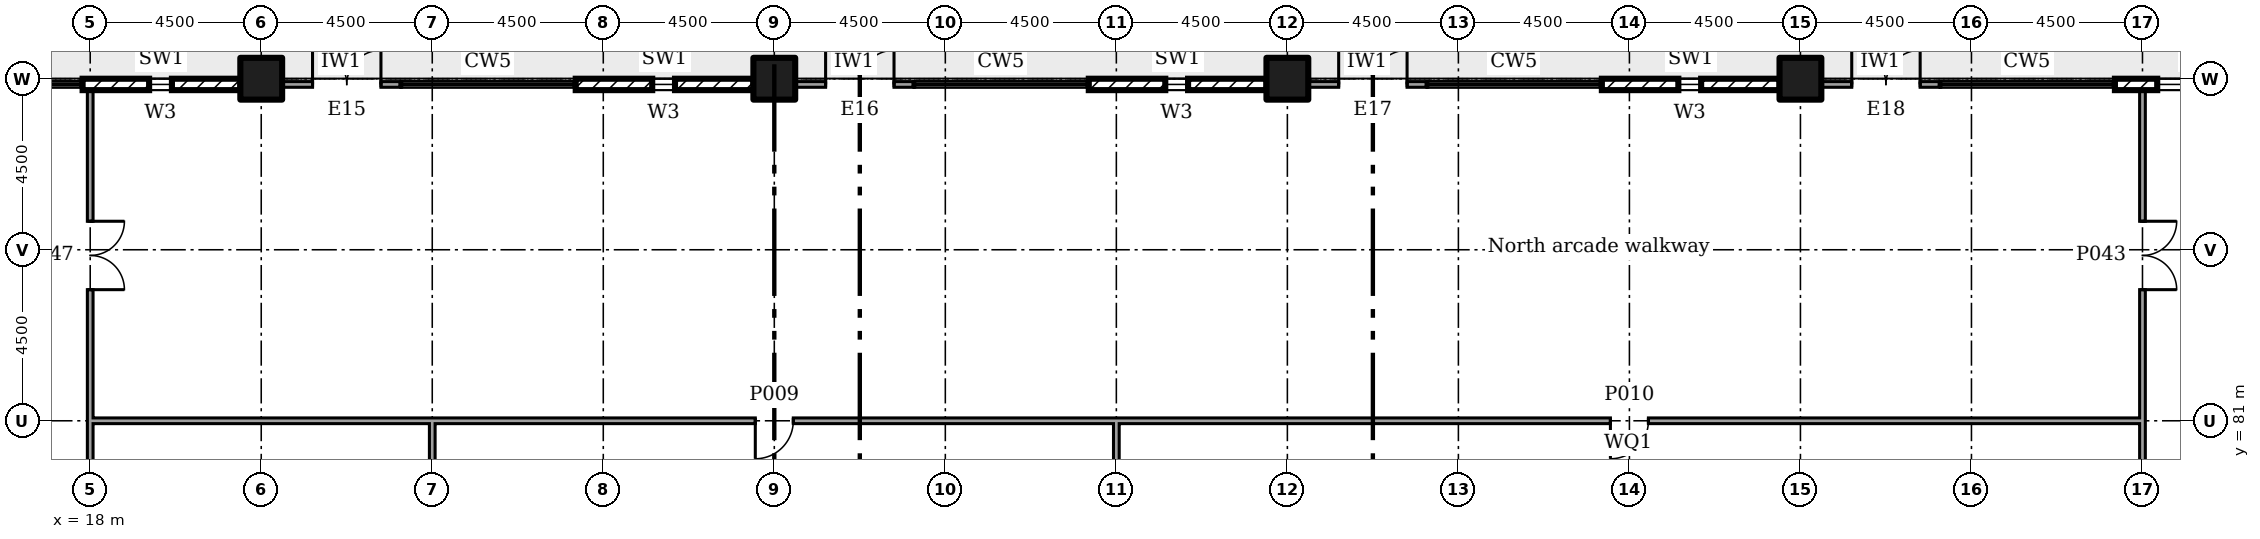
"""IFC4 building model, lengths in metres.
Left out: names, types, materials, properties, quantities, classifications, styles, units other than length and angle.
Written with IfcOpenShell. Run it as: python <this file> out.ifc"""

import sys

from ifc_helpers import new_model, si_unit, direction, frame, frame_2d, origin, origin_2d, place, context, subcontext, project, spatial, rectangle, extrude, element, fill, save


model = new_model("IFC4")
c1 = context("Model", 3, precision=1e-05, world=origin(), true_north=direction((0.0, 1.0)))
c2 = subcontext(c1, "Body", "Model", "MODEL_VIEW")
j1 = project(units=[si_unit("LENGTHUNIT", "METRE"), si_unit("PLANEANGLEUNIT", "RADIAN")], contexts=[c1])
p1 = place(None, origin())
s1 = spatial("IfcSite", under=j1, at=p1, CompositionType="ELEMENT")
p2 = place(p1, origin())
s2 = spatial("IfcBuilding", under=s1, at=p2, CompositionType="ELEMENT")
p3 = place(p2, frame((0.0, 0.0, 6.0)))
s3 = spatial("IfcBuildingStorey", under=s2, at=p3, CompositionType="ELEMENT", Elevation=6.0)
for number, where in (
    (1, (22.5, 90.0, 0.0)),
    (2, (36.0, 90.0, 0.0)),
    (3, (49.5, 90.0, 0.0)),
    (4, (63.0, 90.0, 0.0)),
):
    element("IfcColumn", number, at=place(p3, frame(where)), inside=s3, PredefinedType="COLUMN", context=c2, shape_type="SweptSolid", body=[
        extrude(rectangle(XDim=1.1, YDim=1.1, at=origin_2d()), origin(), (0.0, 0.0, 1.0), 5.5),
    ])
p4 = place(p3, frame((75.95, 89.85, 0.0), z_axis=(0.0, 0.0, 1.0), x_axis=(-1.0, 0.0, 0.0)))
e5 = element("IfcWall", 5, at=p4, inside=s3, PredefinedType="ELEMENTEDWALL", context=c2, shape_type="SweptSolid", body=[
    extrude(rectangle(XDim=4.675, YDim=0.3, at=frame_2d((2.337, 0.0))), origin(), (0.0, 0.0, 1.0), 5.05),
])
p5 = place(p4, frame((1.163, 0.0, 0.45)))
e6 = element("IfcOpeningElement", 6, at=p5, cuts=e5, PredefinedType="OPENING", context=c2, shape_type="SweptSolid", body=[
    extrude(rectangle(XDim=2.4, YDim=2.4, at=frame_2d((1.2, 1.2))), frame((0.0, 0.16, 0.0), z_axis=(0.0, -1.0, 0.0), x_axis=(1.0, 0.0, 0.0)), (0.0, 0.0, 1.0), 0.32),
])
p6 = place(p3, frame((66.65, 89.85, 0.0), z_axis=(0.0, 0.0, 1.0), x_axis=(-1.0, 0.0, 0.0)))
e7 = element("IfcWall", 7, at=p6, inside=s3, PredefinedType="SOLIDWALL", context=c2, shape_type="SweptSolid", body=[
    extrude(rectangle(XDim=3.1, YDim=0.15, at=frame_2d((1.55, 0.0))), origin(), (0.0, 0.0, 1.0), 5.05),
])
p7 = place(p6, frame((0.5, 0.0, 0.0)))
e8 = element("IfcOpeningElement", 8, at=p7, cuts=e7, PredefinedType="OPENING", context=c2, shape_type="SweptSolid", body=[
    extrude(rectangle(XDim=1.8, YDim=2.4, at=frame_2d((0.9, 1.2))), frame((0.0, 0.085, 0.0), z_axis=(0.0, -1.0, 0.0), x_axis=(1.0, 0.0, 0.0)), (0.0, 0.0, 1.0), 0.17),
])
p8 = place(p3, frame((62.45, 89.85, 0.0), z_axis=(0.0, 0.0, 1.0), x_axis=(-1.0, 0.0, 0.0)))
e9 = element("IfcWall", 9, at=p8, inside=s3, PredefinedType="ELEMENTEDWALL", context=c2, shape_type="SweptSolid", body=[
    extrude(rectangle(XDim=4.675, YDim=0.3, at=frame_2d((2.337, 0.0))), origin(), (0.0, 0.0, 1.0), 5.05),
])
p9 = place(p8, frame((2.062, 0.0, 0.45)))
e10 = element("IfcOpeningElement", 10, at=p9, cuts=e9, PredefinedType="OPENING", context=c2, shape_type="SweptSolid", body=[
    extrude(rectangle(XDim=0.6, YDim=2.4, at=frame_2d((0.3, 1.2))), frame((0.0, 0.16, 0.0), z_axis=(0.0, -1.0, 0.0), x_axis=(1.0, 0.0, 0.0)), (0.0, 0.0, 1.0), 0.32),
])
p10 = place(p3, frame((53.15, 89.85, 0.0), z_axis=(0.0, 0.0, 1.0), x_axis=(-1.0, 0.0, 0.0)))
e11 = element("IfcWall", 11, at=p10, inside=s3, PredefinedType="SOLIDWALL", context=c2, shape_type="SweptSolid", body=[
    extrude(rectangle(XDim=3.1, YDim=0.15, at=frame_2d((1.55, 0.0))), origin(), (0.0, 0.0, 1.0), 5.05),
])
p11 = place(p10, frame((0.5, 0.0, 0.0)))
e12 = element("IfcOpeningElement", 12, at=p11, cuts=e11, PredefinedType="OPENING", context=c2, shape_type="SweptSolid", body=[
    extrude(rectangle(XDim=1.8, YDim=2.4, at=frame_2d((0.9, 1.2))), frame((0.0, 0.085, 0.0), z_axis=(0.0, -1.0, 0.0), x_axis=(1.0, 0.0, 0.0)), (0.0, 0.0, 1.0), 0.17),
])
p12 = place(p3, frame((48.95, 89.85, 0.0), z_axis=(0.0, 0.0, 1.0), x_axis=(-1.0, 0.0, 0.0)))
e13 = element("IfcWall", 13, at=p12, inside=s3, PredefinedType="ELEMENTEDWALL", context=c2, shape_type="SweptSolid", body=[
    extrude(rectangle(XDim=4.675, YDim=0.3, at=frame_2d((2.337, 0.0))), origin(), (0.0, 0.0, 1.0), 5.05),
])
p13 = place(p12, frame((2.062, 0.0, 0.45)))
e14 = element("IfcOpeningElement", 14, at=p13, cuts=e13, PredefinedType="OPENING", context=c2, shape_type="SweptSolid", body=[
    extrude(rectangle(XDim=0.6, YDim=2.4, at=frame_2d((0.3, 1.2))), frame((0.0, 0.16, 0.0), z_axis=(0.0, -1.0, 0.0), x_axis=(1.0, 0.0, 0.0)), (0.0, 0.0, 1.0), 0.32),
])
p14 = place(p3, frame((39.65, 89.85, 0.0), z_axis=(0.0, 0.0, 1.0), x_axis=(-1.0, 0.0, 0.0)))
e15 = element("IfcWall", 15, at=p14, inside=s3, PredefinedType="SOLIDWALL", context=c2, shape_type="SweptSolid", body=[
    extrude(rectangle(XDim=3.1, YDim=0.15, at=frame_2d((1.55, 0.0))), origin(), (0.0, 0.0, 1.0), 5.05),
])
p15 = place(p14, frame((0.5, 0.0, 0.0)))
e16 = element("IfcOpeningElement", 16, at=p15, cuts=e15, PredefinedType="OPENING", context=c2, shape_type="SweptSolid", body=[
    extrude(rectangle(XDim=1.8, YDim=2.4, at=frame_2d((0.9, 1.2))), frame((0.0, 0.085, 0.0), z_axis=(0.0, -1.0, 0.0), x_axis=(1.0, 0.0, 0.0)), (0.0, 0.0, 1.0), 0.17),
])
p16 = place(p3, frame((35.45, 89.85, 0.0), z_axis=(0.0, 0.0, 1.0), x_axis=(-1.0, 0.0, 0.0)))
e17 = element("IfcWall", 17, at=p16, inside=s3, PredefinedType="ELEMENTEDWALL", context=c2, shape_type="SweptSolid", body=[
    extrude(rectangle(XDim=4.675, YDim=0.3, at=frame_2d((2.337, 0.0))), origin(), (0.0, 0.0, 1.0), 5.05),
])
p17 = place(p16, frame((2.062, 0.0, 0.45)))
e18 = element("IfcOpeningElement", 18, at=p17, cuts=e17, PredefinedType="OPENING", context=c2, shape_type="SweptSolid", body=[
    extrude(rectangle(XDim=0.6, YDim=2.4, at=frame_2d((0.3, 1.2))), frame((0.0, 0.16, 0.0), z_axis=(0.0, -1.0, 0.0), x_axis=(1.0, 0.0, 0.0)), (0.0, 0.0, 1.0), 0.32),
])
p18 = place(p3, frame((26.15, 89.85, 0.0), z_axis=(0.0, 0.0, 1.0), x_axis=(-1.0, 0.0, 0.0)))
e19 = element("IfcWall", 19, at=p18, inside=s3, PredefinedType="SOLIDWALL", context=c2, shape_type="SweptSolid", body=[
    extrude(rectangle(XDim=3.1, YDim=0.15, at=frame_2d((1.55, 0.0))), origin(), (0.0, 0.0, 1.0), 5.05),
])
p19 = place(p18, frame((0.5, 0.0, 0.0)))
e20 = element("IfcOpeningElement", 20, at=p19, cuts=e19, PredefinedType="OPENING", context=c2, shape_type="SweptSolid", body=[
    extrude(rectangle(XDim=1.8, YDim=2.4, at=frame_2d((0.9, 1.2))), frame((0.0, 0.085, 0.0), z_axis=(0.0, -1.0, 0.0), x_axis=(1.0, 0.0, 0.0)), (0.0, 0.0, 1.0), 0.17),
])
p20 = place(p3, frame((21.95, 89.85, 0.0), z_axis=(0.0, 0.0, 1.0), x_axis=(-1.0, 0.0, 0.0)))
e21 = element("IfcWall", 21, at=p20, inside=s3, PredefinedType="ELEMENTEDWALL", context=c2, shape_type="SweptSolid", body=[
    extrude(rectangle(XDim=4.15, YDim=0.3, at=frame_2d((2.075, 0.0))), origin(), (0.0, 0.0, 1.0), 5.05),
])
p21 = place(p20, frame((1.8, 0.0, 0.45)))
e22 = element("IfcOpeningElement", 22, at=p21, cuts=e21, PredefinedType="OPENING", context=c2, shape_type="SweptSolid", body=[
    extrude(rectangle(XDim=0.6, YDim=2.4, at=frame_2d((0.3, 1.2))), frame((0.0, 0.16, 0.0), z_axis=(0.0, -1.0, 0.0), x_axis=(1.0, 0.0, 0.0)), (0.0, 0.0, 1.0), 0.32),
])
p22 = place(p3, frame((72.0, 80.925, 0.0), z_axis=(0.0, 0.0, 1.0), x_axis=(0.0, 1.0, 0.0)))
e23 = element("IfcWall", 23, at=p22, inside=s3, PredefinedType="PARTITIONING", context=c2, shape_type="SweptSolid", body=[
    extrude(rectangle(XDim=8.775, YDim=0.15, at=frame_2d((4.387, 0.0))), origin(), (0.0, 0.0, 1.0), 5.05),
])
p23 = place(p22, frame((3.525, 0.0, 0.0)))
e24 = element("IfcOpeningElement", 24, at=p23, cuts=e23, PredefinedType="OPENING", context=c2, shape_type="SweptSolid", body=[
    extrude(rectangle(XDim=1.8, YDim=2.1, at=frame_2d((0.9, 1.05))), frame((0.0, 0.085, 0.0), z_axis=(0.0, -1.0, 0.0), x_axis=(1.0, 0.0, 0.0)), (0.0, 0.0, 1.0), 0.17),
])
p24 = place(p3, frame((72.0, 76.425, 0.0), z_axis=(0.0, 0.0, 1.0), x_axis=(0.0, 1.0, 0.0)))
e25 = element("IfcWall", 25, at=p24, inside=s3, PredefinedType="PARTITIONING", context=c2, shape_type="SweptSolid", body=[
    extrude(rectangle(XDim=4.575, YDim=0.15, at=frame_2d((2.288, 0.0))), origin(), (0.0, 0.0, 1.0), 5.05),
])
p25 = place(p3, frame((18.0, 80.925, 0.0), z_axis=(0.0, 0.0, 1.0), x_axis=(0.0, 1.0, 0.0)))
e26 = element("IfcWall", 26, at=p25, inside=s3, PredefinedType="PARTITIONING", context=c2, shape_type="SweptSolid", body=[
    extrude(rectangle(XDim=8.775, YDim=0.15, at=frame_2d((4.387, 0.0))), origin(), (0.0, 0.0, 1.0), 5.05),
])
p26 = place(p25, frame((3.525, 0.0, 0.0)))
e27 = element("IfcOpeningElement", 27, at=p26, cuts=e26, PredefinedType="OPENING", context=c2, shape_type="SweptSolid", body=[
    extrude(rectangle(XDim=1.8, YDim=2.1, at=frame_2d((0.9, 1.05))), frame((0.0, 0.085, 0.0), z_axis=(0.0, -1.0, 0.0), x_axis=(1.0, 0.0, 0.0)), (0.0, 0.0, 1.0), 0.17),
])
p27 = place(p3, frame((18.0, 72.0, 0.0), z_axis=(0.0, 0.0, 1.0), x_axis=(0.0, 1.0, 0.0)))
e28 = element("IfcWall", 28, at=p27, inside=s3, PredefinedType="PARTITIONING", context=c2, shape_type="SweptSolid", body=[
    extrude(rectangle(XDim=9.0, YDim=0.15, at=frame_2d((4.5, 0.0))), origin(), (0.0, 0.0, 1.0), 5.05),
])
p28 = place(p27, frame((4.0, 0.0, 0.0)))
e29 = element("IfcOpeningElement", 29, at=p28, cuts=e28, PredefinedType="OPENING", context=c2, shape_type="SweptSolid", body=[
    extrude(rectangle(XDim=1.0, YDim=2.1, at=frame_2d((0.5, 1.05))), frame((0.0, 0.085, 0.0), z_axis=(0.0, -1.0, 0.0), x_axis=(1.0, 0.0, 0.0)), (0.0, 0.0, 1.0), 0.17),
])
p29 = place(p3, frame((18.075, 81.0, 0.0)))
e30 = element("IfcWall", 30, at=p29, inside=s3, PredefinedType="PARTITIONING", context=c2, shape_type="SweptSolid", body=[
    extrude(rectangle(XDim=9.0, YDim=0.15, at=frame_2d((4.5, 0.0))), origin(), (0.0, 0.0, 1.0), 5.05),
])
p30 = place(p3, frame((27.0, 81.0, 0.0)))
e31 = element("IfcWall", 31, at=p30, inside=s3, PredefinedType="PARTITIONING", context=c2, shape_type="SweptSolid", body=[
    extrude(rectangle(XDim=18.075, YDim=0.15, at=frame_2d((9.038, 0.0))), origin(), (0.0, 0.0, 1.0), 5.05),
])
p31 = place(p30, frame((8.5, 0.0, 0.0)))
e32 = element("IfcOpeningElement", 32, at=p31, cuts=e31, PredefinedType="OPENING", context=c2, shape_type="SweptSolid", body=[
    extrude(rectangle(XDim=1.0, YDim=2.1, at=frame_2d((0.5, 1.05))), frame((0.0, 0.085, 0.0), z_axis=(0.0, -1.0, 0.0), x_axis=(1.0, 0.0, 0.0)), (0.0, 0.0, 1.0), 0.17),
])
p32 = place(p3, frame((45.0, 81.0, 0.0)))
e33 = element("IfcWall", 33, at=p32, inside=s3, PredefinedType="PARTITIONING", context=c2, shape_type="SweptSolid", body=[
    extrude(rectangle(XDim=26.925, YDim=0.15, at=frame_2d((13.462, 0.0))), origin(), (0.0, 0.0, 1.0), 5.05),
])
p33 = place(p32, frame((13.0, 0.0, 0.0)))
e34 = element("IfcOpeningElement", 34, at=p33, cuts=e33, PredefinedType="OPENING", context=c2, shape_type="SweptSolid", body=[
    extrude(rectangle(XDim=1.0, YDim=2.1, at=frame_2d((0.5, 1.05))), frame((0.0, 0.085, 0.0), z_axis=(0.0, -1.0, 0.0), x_axis=(1.0, 0.0, 0.0)), (0.0, 0.0, 1.0), 0.17),
])
p34 = place(p3, frame((27.0, 71.925, 0.0), z_axis=(0.0, 0.0, 1.0), x_axis=(0.0, 1.0, 0.0)))
e35 = element("IfcWall", 35, at=p34, inside=s3, PredefinedType="PARTITIONING", context=c2, shape_type="SweptSolid", body=[
    extrude(rectangle(XDim=9.0, YDim=0.15, at=frame_2d((4.5, 0.0))), origin(), (0.0, 0.0, 1.0), 5.05),
])
p35 = place(p3, frame((45.0, 73.295, 0.0), z_axis=(0.0, 0.0, 1.0), x_axis=(0.0, 1.0, 0.0)))
e36 = element("IfcWall", 36, at=p35, inside=s3, PredefinedType="PARTITIONING", context=c2, shape_type="SweptSolid", body=[
    extrude(rectangle(XDim=7.63, YDim=0.15, at=frame_2d((3.815, 0.0))), origin(), (0.0, 0.0, 1.0), 5.05),
])
p36 = place(p5, origin())
e37 = element("IfcWindow", 37, at=p36, inside=s3, PartitioningType="SINGLE_PANEL", PredefinedType="WINDOW", context=c2, shape_type="SweptSolid", body=[
    extrude(rectangle(XDim=2.4, YDim=2.4, at=frame_2d((1.2, 1.2))), frame((0.0, 0.03, 0.0), z_axis=(0.0, -1.0, 0.0), x_axis=(1.0, 0.0, 0.0)), (0.0, 0.0, 1.0), 0.06),
])
fill(e6, e37)
p37 = place(p7, frame((1.8, 0.0, 0.0), x_axis=(-1.0, 0.0, 0.0)))
e38 = element("IfcDoor", 38, at=p37, inside=s3, OperationType="DOUBLE_DOOR_DOUBLE_SWING", PredefinedType="NOTDEFINED", context=c2, shape_type="SweptSolid", body=[
    extrude(rectangle(XDim=1.8, YDim=2.4, at=frame_2d((0.9, 1.2))), frame((0.0, 0.025, 0.0), z_axis=(0.0, -1.0, 0.0), x_axis=(1.0, 0.0, 0.0)), (0.0, 0.0, 1.0), 0.05),
])
fill(e8, e38)
p38 = place(p9, origin())
e39 = element("IfcWindow", 39, at=p38, inside=s3, PartitioningType="SINGLE_PANEL", PredefinedType="WINDOW", context=c2, shape_type="SweptSolid", body=[
    extrude(rectangle(XDim=0.6, YDim=2.4, at=frame_2d((0.3, 1.2))), frame((0.0, 0.03, 0.0), z_axis=(0.0, -1.0, 0.0), x_axis=(1.0, 0.0, 0.0)), (0.0, 0.0, 1.0), 0.06),
])
fill(e10, e39)
p39 = place(p11, frame((1.8, 0.0, 0.0), x_axis=(-1.0, 0.0, 0.0)))
e40 = element("IfcDoor", 40, at=p39, inside=s3, OperationType="DOUBLE_DOOR_DOUBLE_SWING", PredefinedType="NOTDEFINED", context=c2, shape_type="SweptSolid", body=[
    extrude(rectangle(XDim=1.8, YDim=2.4, at=frame_2d((0.9, 1.2))), frame((0.0, 0.025, 0.0), z_axis=(0.0, -1.0, 0.0), x_axis=(1.0, 0.0, 0.0)), (0.0, 0.0, 1.0), 0.05),
])
fill(e12, e40)
p40 = place(p13, origin())
e41 = element("IfcWindow", 41, at=p40, inside=s3, PartitioningType="SINGLE_PANEL", PredefinedType="WINDOW", context=c2, shape_type="SweptSolid", body=[
    extrude(rectangle(XDim=0.6, YDim=2.4, at=frame_2d((0.3, 1.2))), frame((0.0, 0.03, 0.0), z_axis=(0.0, -1.0, 0.0), x_axis=(1.0, 0.0, 0.0)), (0.0, 0.0, 1.0), 0.06),
])
fill(e14, e41)
p41 = place(p15, frame((1.8, 0.0, 0.0), x_axis=(-1.0, 0.0, 0.0)))
e42 = element("IfcDoor", 42, at=p41, inside=s3, OperationType="DOUBLE_DOOR_DOUBLE_SWING", PredefinedType="NOTDEFINED", context=c2, shape_type="SweptSolid", body=[
    extrude(rectangle(XDim=1.8, YDim=2.4, at=frame_2d((0.9, 1.2))), frame((0.0, 0.025, 0.0), z_axis=(0.0, -1.0, 0.0), x_axis=(1.0, 0.0, 0.0)), (0.0, 0.0, 1.0), 0.05),
])
fill(e16, e42)
p42 = place(p17, origin())
e43 = element("IfcWindow", 43, at=p42, inside=s3, PartitioningType="SINGLE_PANEL", PredefinedType="WINDOW", context=c2, shape_type="SweptSolid", body=[
    extrude(rectangle(XDim=0.6, YDim=2.4, at=frame_2d((0.3, 1.2))), frame((0.0, 0.03, 0.0), z_axis=(0.0, -1.0, 0.0), x_axis=(1.0, 0.0, 0.0)), (0.0, 0.0, 1.0), 0.06),
])
fill(e18, e43)
p43 = place(p19, frame((1.8, 0.0, 0.0), x_axis=(-1.0, 0.0, 0.0)))
e44 = element("IfcDoor", 44, at=p43, inside=s3, OperationType="DOUBLE_DOOR_DOUBLE_SWING", PredefinedType="NOTDEFINED", context=c2, shape_type="SweptSolid", body=[
    extrude(rectangle(XDim=1.8, YDim=2.4, at=frame_2d((0.9, 1.2))), frame((0.0, 0.025, 0.0), z_axis=(0.0, -1.0, 0.0), x_axis=(1.0, 0.0, 0.0)), (0.0, 0.0, 1.0), 0.05),
])
fill(e20, e44)
p44 = place(p21, origin())
e45 = element("IfcWindow", 45, at=p44, inside=s3, PartitioningType="SINGLE_PANEL", PredefinedType="WINDOW", context=c2, shape_type="SweptSolid", body=[
    extrude(rectangle(XDim=0.6, YDim=2.4, at=frame_2d((0.3, 1.2))), frame((0.0, 0.03, 0.0), z_axis=(0.0, -1.0, 0.0), x_axis=(1.0, 0.0, 0.0)), (0.0, 0.0, 1.0), 0.06),
])
fill(e22, e45)
p45 = place(p31, frame((1.0, 0.0, 0.0), x_axis=(-1.0, 0.0, 0.0)))
e46 = element("IfcDoor", 46, at=p45, inside=s3, OperationType="SINGLE_SWING_LEFT", PredefinedType="DOOR", context=c2, shape_type="SweptSolid", body=[
    extrude(rectangle(XDim=1.0, YDim=2.1, at=frame_2d((0.5, 1.05))), frame((0.0, 0.025, 0.0), z_axis=(0.0, -1.0, 0.0), x_axis=(1.0, 0.0, 0.0)), (0.0, 0.0, 1.0), 0.05),
])
fill(e32, e46)
p46 = place(p33, frame((1.0, 0.0, 0.0), x_axis=(-1.0, 0.0, 0.0)))
e47 = element("IfcDoor", 47, at=p46, inside=s3, OperationType="SINGLE_SWING_LEFT", PredefinedType="DOOR", context=c2, shape_type="SweptSolid", body=[
    extrude(rectangle(XDim=1.0, YDim=2.1, at=frame_2d((0.5, 1.05))), frame((0.0, 0.025, 0.0), z_axis=(0.0, -1.0, 0.0), x_axis=(1.0, 0.0, 0.0)), (0.0, 0.0, 1.0), 0.05),
])
fill(e34, e47)
p47 = place(p23, frame((1.8, 0.0, 0.0), x_axis=(-1.0, 0.0, 0.0)))
e48 = element("IfcDoor", 48, at=p47, inside=s3, OperationType="DOUBLE_DOOR_SINGLE_SWING", PredefinedType="DOOR", context=c2, shape_type="SweptSolid", body=[
    extrude(rectangle(XDim=1.8, YDim=2.1, at=frame_2d((0.9, 1.05))), frame((0.0, 0.025, 0.0), z_axis=(0.0, -1.0, 0.0), x_axis=(1.0, 0.0, 0.0)), (0.0, 0.0, 1.0), 0.05),
])
fill(e24, e48)
p48 = place(p26, frame((1.8, 0.0, 0.0), x_axis=(-1.0, 0.0, 0.0)))
e49 = element("IfcDoor", 49, at=p48, inside=s3, OperationType="DOUBLE_DOOR_SINGLE_SWING", PredefinedType="DOOR", context=c2, shape_type="SweptSolid", body=[
    extrude(rectangle(XDim=1.8, YDim=2.1, at=frame_2d((0.9, 1.05))), frame((0.0, 0.025, 0.0), z_axis=(0.0, -1.0, 0.0), x_axis=(1.0, 0.0, 0.0)), (0.0, 0.0, 1.0), 0.05),
])
fill(e27, e49)
save(model, sys.argv[1])
